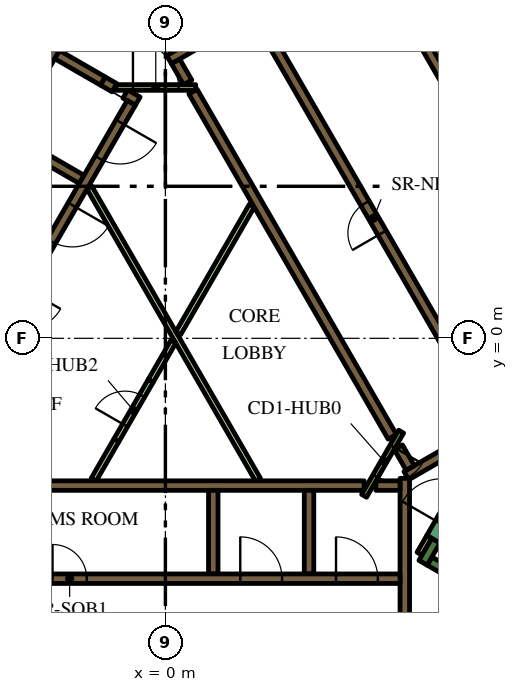
"""IFC4 building model, lengths in metres.
Left out: names, types, materials, properties, quantities, classifications, styles, units other than length and angle.
Written with IfcOpenShell. Run it as: python <this file> out.ifc"""

import sys

from ifc_helpers import new_model, si_unit, direction, frame, frame_2d, origin, place, context, subcontext, project, spatial, polyline, rectangle, outline, extrude, element, fill, save


model = new_model("IFC4")
c1 = context("Model", 3, precision=1e-05, world=origin(), true_north=direction((0.0, 1.0)))
c2 = subcontext(c1, "Body", "Model", "MODEL_VIEW")
j1 = project(units=[si_unit("LENGTHUNIT", "METRE"), si_unit("PLANEANGLEUNIT", "RADIAN")], contexts=[c1])
p1 = place(None, origin())
s1 = spatial("IfcSite", under=j1, at=p1, CompositionType="ELEMENT")
p2 = place(p1, origin())
s2 = spatial("IfcBuilding", under=s1, at=p2, CompositionType="ELEMENT")
p3 = place(p2, frame((0.0, 0.0, 51.0)))
s3 = spatial("IfcBuildingStorey", under=s2, at=p3, CompositionType="ELEMENT", Elevation=51.0)
p4 = place(p3, frame((6.776, 13.364, 0.0), z_axis=(0.0, 0.0, 1.0), x_axis=(0.500004177138, -0.8660229921, 0.0)))
e1 = element("IfcWall", 1, at=p4, inside=s3, PredefinedType="SOLIDWALL", context=c2, shape_type="SweptSolid", body=[
    extrude(rectangle(XDim=20.204, YDim=0.9, at=frame_2d((10.102, 0.0))), origin(), (0.0, 0.0, 1.0), 3.9),
])
p5 = place(p3, frame((12.84, -9.261, 0.0), z_axis=(0.0, 0.0, 1.0), x_axis=(-0.866013990052, 0.500019768644, 0.0)))
e2 = element("IfcWall", 2, at=p5, inside=s3, PredefinedType="SOLIDWALL", context=c2, shape_type="SweptSolid", body=[
    extrude(rectangle(XDim=6.8, YDim=0.25, at=frame_2d((3.4, 0.0))), origin(), (0.0, 0.0, 1.0), 3.9),
])
p6 = place(p3, frame((6.78, -5.906, 0.0), z_axis=(0.0, 0.0, 1.0), x_axis=(0.500223362819, 0.865896406789, 0.0)))
e3 = element("IfcWall", 3, at=p6, inside=s3, PredefinedType="SOLIDWALL", context=c2, shape_type="SweptSolid", body=[
    extrude(rectangle(XDim=0.675, YDim=0.25, at=frame_2d((0.337, 0.0))), origin(), (0.0, 0.0, 1.0), 3.9),
])
p7 = place(p3, frame((-5.259, -3.875, 0.0), z_axis=(0.0, 0.0, 1.0), x_axis=(1.0, 0.0, 0.0)))
e4 = element("IfcWall", 4, at=p7, inside=s3, PredefinedType="SOLIDWALL", context=c2, shape_type="SweptSolid", body=[
    extrude(rectangle(XDim=10.489, YDim=0.25, at=frame_2d((5.244, 0.0))), origin(), (0.0, 0.0, 1.0), 3.9),
])
for number, where, z_axis, x_axis in (
    (5, (3.78, -4.0, 0.0), (0.0, 0.0, 1.0), (0.0, -1.0, 0.0)),
    (6, (1.26, -4.0, 0.0), (0.0, 0.0, 1.0), (0.0, -1.0, 0.0)),
):
    element("IfcWall", number, at=place(p3, frame(where, z_axis=z_axis, x_axis=x_axis)), inside=s3, PredefinedType="SOLIDWALL", context=c2, shape_type="SweptSolid", body=[
        extrude(rectangle(XDim=2.2, YDim=0.25, at=frame_2d((1.1, 0.0))), origin(), (0.0, 0.0, 1.0), 3.9),
    ])
p8 = place(p3, frame((6.3, -7.27, 0.0), z_axis=(0.0, 0.0, 1.0), x_axis=(0.0, 1.0, 0.0)))
e7 = element("IfcWall", 7, at=p8, inside=s3, PredefinedType="SOLIDWALL", context=c2, shape_type="SweptSolid", body=[
    extrude(rectangle(XDim=3.586, YDim=0.25, at=frame_2d((1.793, 0.0))), origin(), (0.0, 0.0, 1.0), 3.9),
])
p9 = place(p3, frame((5.538, -3.875, 0.0), z_axis=(0.0, 0.0, 1.0), x_axis=(1.0, 0.0, 0.0)))
e8 = element("IfcWall", 8, at=p9, inside=s3, PredefinedType="SOLIDWALL", context=c2, shape_type="SweptSolid", body=[
    extrude(rectangle(XDim=0.637, YDim=0.25, at=frame_2d((0.318, 0.0))), origin(), (0.0, 0.0, 1.0), 3.9),
])
p10 = place(p3, frame((9.346, -1.879, 0.0), z_axis=(0.0, 0.0, 1.0), x_axis=(-0.866048528039, -0.499959945477, 0.0)))
e9 = element("IfcWall", 9, at=p10, inside=s3, PredefinedType="SOLIDWALL", context=c2, shape_type="SweptSolid", body=[
    extrude(rectangle(XDim=3.47, YDim=0.25, at=frame_2d((1.735, 0.0))), origin(), (0.0, 0.0, 1.0), 3.9),
])
p11 = place(p3, frame((6.13, -2.867, 0.0), z_axis=(0.0, 0.0, 1.0), x_axis=(0.500160776593, -0.865932559475, 0.0)))
e10 = element("IfcWall", 10, at=p11, inside=s3, PredefinedType="SOLIDWALL", context=c2, shape_type="SweptSolid", body=[
    extrude(rectangle(XDim=0.627, YDim=0.25, at=frame_2d((0.313, 0.0))), origin(), (0.0, 0.0, 1.0), 3.9),
])
p12 = place(p3, origin())
e11 = element("IfcWall", 11, at=p12, inside=s3, PredefinedType="SOLIDWALL", context=c2, shape_type="SweptSolid", body=[
    extrude(outline(polyline([(2.776, 8.733), (2.499, 8.573), (2.498, 8.573), (2.498, 8.573), (2.282, 8.448), (2.282, 8.448), (0.377, 7.348), (0.16, 7.223), (0.035, 7.439), (3.032, 9.169), (3.03, 9.152), (3.03, 9.133), (3.031, 9.113), (3.035, 9.094), (3.04, 9.075), (3.047, 9.057), (3.056, 9.039), (3.119, 8.931), (2.776, 8.733)])), origin(), (0.0, 0.0, 1.0), 3.9),
])
p13 = place(p3, frame((0.268, 7.285, 0.0), z_axis=(0.0, 0.0, 1.0), x_axis=(0.500098681536, -0.865968422476, 0.0)))
e12 = element("IfcWall", 12, at=p13, inside=s3, PredefinedType="SOLIDWALL", context=c2, shape_type="SweptSolid", body=[
    extrude(rectangle(XDim=0.636, YDim=0.25, at=frame_2d((0.318, 0.0))), origin(), (0.0, 0.0, 1.0), 3.9),
])
p14 = place(p3, frame((5.97, -2.591, 0.0), z_axis=(0.0, 0.0, 1.0), x_axis=(-0.499994469932, 0.866028596547, 0.0)))
e13 = element("IfcWall", 13, at=p14, inside=s3, PredefinedType="SOLIDWALL", context=c2, shape_type="SweptSolid", body=[
    extrude(rectangle(XDim=10.488, YDim=0.25, at=frame_2d((5.244, 0.0))), origin(), (0.0, 0.0, 1.0), 3.9),
])
p15 = place(p3, frame((-8.06, -1.311, 0.0), z_axis=(0.0, 0.0, 1.0), x_axis=(0.50000273126, 0.866023826885, 0.0)))
e14 = element("IfcWall", 14, at=p15, inside=s3, PredefinedType="SOLIDWALL", context=c2, shape_type="SweptSolid", body=[
    extrude(rectangle(XDim=10.33, YDim=0.25, at=frame_2d((5.165, 0.0))), origin(), (0.0, 0.0, 1.0), 3.9),
])
p16 = place(p3, frame((-1.342, 6.595, 0.0), z_axis=(0.0, 0.0, 1.0), x_axis=(-0.866046247233, 0.49996389635, 0.0)))
e15 = element("IfcWall", 15, at=p16, inside=s3, PredefinedType="SOLIDWALL", context=c2, shape_type="SweptSolid", body=[
    extrude(rectangle(XDim=0.35, YDim=0.25, at=frame_2d((0.175, 0.0))), origin(), (0.0, 0.0, 1.0), 3.9),
])
p17 = place(p3, frame((-1.647, 6.771, 0.0), z_axis=(0.0, 0.0, 1.0), x_axis=(-0.865971728693, 0.500092956464, 0.0)))
e16 = element("IfcWall", 16, at=p17, inside=s3, PredefinedType="SOLIDWALL", context=c2, shape_type="SweptSolid", body=[
    extrude(rectangle(XDim=1.388, YDim=0.25, at=frame_2d((0.694, 0.0))), origin(), (0.0, 0.0, 1.0), 3.9),
])
p18 = place(p3, frame((-0.728, 6.24, 0.0), z_axis=(0.0, 0.0, 1.0), x_axis=(-0.866088799389, 0.499890179513, 0.0)))
e17 = element("IfcWall", 17, at=p18, inside=s3, PredefinedType="SOLIDWALL", context=c2, shape_type="SweptSolid", body=[
    extrude(rectangle(XDim=0.378, YDim=0.25, at=frame_2d((0.189, 0.0))), origin(), (0.0, 0.0, 1.0), 3.9),
])
p19 = place(p3, frame((-2.204, 4.182, 0.0), z_axis=(0.0, 0.0, 1.0), x_axis=(-0.866008176907, 0.50002983664, 0.0)))
e18 = element("IfcWall", 18, at=p19, inside=s3, PredefinedType="SOLIDWALL", context=c2, shape_type="SweptSolid", body=[
    extrude(rectangle(XDim=2.2, YDim=0.25, at=frame_2d((1.1, 0.0))), origin(), (0.0, 0.0, 1.0), 3.9),
])
p20 = place(p3, frame((-1.887, -3.718, 0.0), z_axis=(0.0, 0.0, 1.0), x_axis=(0.500057179532, 0.865992388649, 0.0)))
e19 = element("IfcWall", 19, at=p20, inside=s3, PredefinedType="PARTITIONING", context=c2, shape_type="SweptSolid", body=[
    extrude(rectangle(XDim=1.199, YDim=0.15, at=frame_2d((0.6, 0.0))), origin(), (0.0, 0.0, 1.0), 2.75),
])
p21 = place(p3, frame((6.945, -5.222, 0.0), z_axis=(0.0, 0.0, 1.0), x_axis=(-0.499818422106, -0.866130212453, 0.0)))
e20 = element("IfcWall", 20, at=p21, inside=s3, PredefinedType="PARTITIONING", context=c2, shape_type="SweptSolid", body=[
    extrude(rectangle(XDim=0.514, YDim=0.15, at=frame_2d((0.257, 0.0))), origin(), (0.0, 0.0, 1.0), 2.75),
])
p22 = place(p3, frame((2.435, -3.718, 0.0), z_axis=(0.0, 0.0, 1.0), x_axis=(-0.499985176046, 0.866033962229, 0.0)))
e21 = element("IfcWall", 21, at=p22, inside=s3, PredefinedType="PARTITIONING", context=c2, shape_type="SweptSolid", body=[
    extrude(rectangle(XDim=8.875, YDim=0.15, at=frame_2d((4.438, 0.0))), origin(), (0.0, 0.0, 1.0), 2.75),
])
p23 = place(p3, frame((0.336, 0.132, 0.0), z_axis=(0.0, 0.0, 1.0), x_axis=(0.500001957507, 0.866024273614, 0.0)))
e22 = element("IfcWall", 22, at=p23, inside=s3, PredefinedType="PARTITIONING", context=c2, shape_type="SweptSolid", body=[
    extrude(rectangle(XDim=3.881, YDim=0.15, at=frame_2d((1.941, 0.0))), origin(), (0.0, 0.0, 1.0), 2.75),
])
p24 = place(p3, frame((-0.387, -1.121, 0.0), z_axis=(0.0, 0.0, 1.0), x_axis=(0.500057179532, 0.865992388649, 0.0)))
e23 = element("IfcWall", 23, at=p24, inside=s3, PredefinedType="PARTITIONING", context=c2, shape_type="SweptSolid", body=[
    extrude(rectangle(XDim=1.199, YDim=0.15, at=frame_2d((0.6, 0.0))), origin(), (0.0, 0.0, 1.0), 2.75),
])
p25 = place(p3, frame((-6.175, -6.325, 0.0), z_axis=(0.0, 0.0, 1.0), x_axis=(1.0, 0.0, 0.0)))
e24 = element("IfcWall", 24, at=p25, inside=s3, PredefinedType="SOLIDWALL", context=c2, shape_type="SweptSolid", body=[
    extrude(rectangle(XDim=12.35, YDim=0.25, at=frame_2d((6.175, 0.0))), origin(), (0.0, 0.0, 1.0), 3.9),
])
p26 = place(p25, frame((3.205, 0.0, 0.0)))
e25 = element("IfcOpeningElement", 25, at=p26, cuts=e24, PredefinedType="OPENING", context=c2, shape_type="SweptSolid", body=[
    extrude(rectangle(XDim=0.9, YDim=2.1, at=frame_2d((0.45, 1.05))), frame((0.0, 0.135, 0.0), z_axis=(0.0, -1.0, 0.0), x_axis=(1.0, 0.0, 0.0)), (0.0, 0.0, 1.0), 0.27),
])
p27 = place(p25, frame((8.145, 0.0, 0.0)))
e26 = element("IfcOpeningElement", 26, at=p27, cuts=e24, PredefinedType="OPENING", context=c2, shape_type="SweptSolid", body=[
    extrude(rectangle(XDim=1.1, YDim=2.1, at=frame_2d((0.55, 1.05))), frame((0.0, 0.135, 0.0), z_axis=(0.0, -1.0, 0.0), x_axis=(1.0, 0.0, 0.0)), (0.0, 0.0, 1.0), 0.27),
])
p28 = place(p25, frame((10.665, 0.0, 0.0)))
e27 = element("IfcOpeningElement", 27, at=p28, cuts=e24, PredefinedType="OPENING", context=c2, shape_type="SweptSolid", body=[
    extrude(rectangle(XDim=1.1, YDim=2.1, at=frame_2d((0.55, 1.05))), frame((0.0, 0.135, 0.0), z_axis=(0.0, -1.0, 0.0), x_axis=(1.0, 0.0, 0.0)), (0.0, 0.0, 1.0), 0.27),
])
p29 = place(p3, frame((11.553, -0.46, 0.0), z_axis=(0.0, 0.0, 1.0), x_axis=(-0.500006514828, 0.866021642414, 0.0)))
e28 = element("IfcWall", 28, at=p29, inside=s3, PredefinedType="SOLIDWALL", context=c2, shape_type="SweptSolid", body=[
    extrude(rectangle(XDim=12.35, YDim=0.25, at=frame_2d((6.175, 0.0))), origin(), (0.0, 0.0, 1.0), 3.9),
])
p30 = place(p29, frame((0.585, 0.0, 0.0)))
e29 = element("IfcOpeningElement", 29, at=p30, cuts=e28, PredefinedType="OPENING", context=c2, shape_type="SweptSolid", body=[
    extrude(rectangle(XDim=1.1, YDim=2.1, at=frame_2d((0.55, 1.05))), frame((0.0, 0.135, 0.0), z_axis=(0.0, -1.0, 0.0), x_axis=(1.0, 0.0, 0.0)), (0.0, 0.0, 1.0), 0.27),
])
p31 = place(p29, frame((3.105, 0.0, 0.0)))
e30 = element("IfcOpeningElement", 30, at=p31, cuts=e28, PredefinedType="OPENING", context=c2, shape_type="SweptSolid", body=[
    extrude(rectangle(XDim=1.1, YDim=2.1, at=frame_2d((0.55, 1.05))), frame((0.0, 0.135, 0.0), z_axis=(0.0, -1.0, 0.0), x_axis=(1.0, 0.0, 0.0)), (0.0, 0.0, 1.0), 0.27),
])
p32 = place(p29, frame((5.625, 0.0, 0.0)))
e31 = element("IfcOpeningElement", 31, at=p32, cuts=e28, PredefinedType="OPENING", context=c2, shape_type="SweptSolid", body=[
    extrude(rectangle(XDim=1.1, YDim=2.1, at=frame_2d((0.55, 1.05))), frame((0.0, 0.135, 0.0), z_axis=(0.0, -1.0, 0.0), x_axis=(1.0, 0.0, 0.0)), (0.0, 0.0, 1.0), 0.27),
])
p33 = place(p3, frame((8.565, -2.185, 0.0), z_axis=(0.0, 0.0, 1.0), x_axis=(-0.499997954832, 0.866026584559, 0.0)))
e32 = element("IfcWall", 32, at=p33, inside=s3, PredefinedType="SOLIDWALL", context=c2, shape_type="SweptSolid", body=[
    extrude(rectangle(XDim=12.35, YDim=0.25, at=frame_2d((6.175, 0.0))), origin(), (0.0, 0.0, 1.0), 3.9),
])
p34 = place(p33, frame((5.725, 0.0, 0.0)))
e33 = element("IfcOpeningElement", 33, at=p34, cuts=e32, PredefinedType="OPENING", context=c2, shape_type="SweptSolid", body=[
    extrude(rectangle(XDim=0.9, YDim=2.1, at=frame_2d((0.45, 1.05))), frame((0.0, 0.135, 0.0), z_axis=(0.0, -1.0, 0.0), x_axis=(1.0, 0.0, 0.0)), (0.0, 0.0, 1.0), 0.27),
])
p35 = place(p3, frame((-0.898, 6.194, 0.0), z_axis=(0.0, 0.0, 1.0), x_axis=(-0.499996202215, -0.866027596426, 0.0)))
e34 = element("IfcWall", 34, at=p35, inside=s3, PredefinedType="SOLIDWALL", context=c2, shape_type="SweptSolid", body=[
    extrude(rectangle(XDim=9.83, YDim=0.25, at=frame_2d((4.915, 0.0))), origin(), (0.0, 0.0, 1.0), 3.9),
])
p36 = place(p35, frame((0.585, 0.0, 0.0)))
e35 = element("IfcOpeningElement", 35, at=p36, cuts=e34, PredefinedType="OPENING", context=c2, shape_type="SweptSolid", body=[
    extrude(rectangle(XDim=1.1, YDim=2.1, at=frame_2d((0.55, 1.05))), frame((0.0, 0.135, 0.0), z_axis=(0.0, -1.0, 0.0), x_axis=(1.0, 0.0, 0.0)), (0.0, 0.0, 1.0), 0.27),
])
p37 = place(p35, frame((3.105, 0.0, 0.0)))
e36 = element("IfcOpeningElement", 36, at=p37, cuts=e34, PredefinedType="OPENING", context=c2, shape_type="SweptSolid", body=[
    extrude(rectangle(XDim=1.1, YDim=2.1, at=frame_2d((0.55, 1.05))), frame((0.0, 0.135, 0.0), z_axis=(0.0, -1.0, 0.0), x_axis=(1.0, 0.0, 0.0)), (0.0, 0.0, 1.0), 0.27),
])
p38 = place(p35, frame((5.625, 0.0, 0.0)))
e37 = element("IfcOpeningElement", 37, at=p38, cuts=e34, PredefinedType="OPENING", context=c2, shape_type="SweptSolid", body=[
    extrude(rectangle(XDim=1.1, YDim=2.1, at=frame_2d((0.55, 1.05))), frame((0.0, 0.135, 0.0), z_axis=(0.0, -1.0, 0.0), x_axis=(1.0, 0.0, 0.0)), (0.0, 0.0, 1.0), 0.27),
])
p39 = place(p35, frame((8.145, 0.0, 0.0)))
e38 = element("IfcOpeningElement", 38, at=p39, cuts=e34, PredefinedType="OPENING", context=c2, shape_type="SweptSolid", body=[
    extrude(rectangle(XDim=1.1, YDim=2.1, at=frame_2d((0.55, 1.05))), frame((0.0, 0.135, 0.0), z_axis=(0.0, -1.0, 0.0), x_axis=(1.0, 0.0, 0.0)), (0.0, 0.0, 1.0), 0.27),
])
p40 = place(p3, frame((7.053, -5.284, 0.0), z_axis=(0.0, 0.0, 1.0), x_axis=(0.500078061341, 0.865980330357, 0.0)))
e39 = element("IfcWall", 39, at=p40, inside=s3, PredefinedType="SOLIDWALL", context=c2, shape_type="SweptSolid", body=[
    extrude(rectangle(XDim=2.1, YDim=0.4, at=frame_2d((1.05, 0.0))), origin(), (0.0, 0.0, 1.0), 3.9),
])
p41 = place(p40, frame((0.45, 0.0, 0.0)))
e40 = element("IfcOpeningElement", 40, at=p41, cuts=e39, PredefinedType="OPENING", context=c2, shape_type="SweptSolid", body=[
    extrude(rectangle(XDim=1.2, YDim=2.1, at=frame_2d((0.6, 1.05))), frame((0.0, 0.21, 0.0), z_axis=(0.0, -1.0, 0.0), x_axis=(1.0, 0.0, 0.0)), (0.0, 0.0, 1.0), 0.42),
])
p42 = place(p3, frame((6.203, -2.456, 0.0), z_axis=(0.0, 0.0, 1.0), x_axis=(-0.500043961785, -0.866000020948, 0.0)))
e41 = element("IfcWall", 41, at=p42, inside=s3, PredefinedType="PARTITIONING", context=c2, shape_type="SweptSolid", body=[
    extrude(rectangle(XDim=1.95, YDim=0.15, at=frame_2d((0.975, 0.0))), origin(), (0.0, 0.0, 1.0), 3.9),
])
p43 = place(p42, frame((0.45, 0.0, 0.0)))
e42 = element("IfcOpeningElement", 42, at=p43, cuts=e41, PredefinedType="OPENING", context=c2, shape_type="SweptSolid", body=[
    extrude(rectangle(XDim=0.9, YDim=2.1, at=frame_2d((0.45, 1.05))), frame((0.0, 0.085, 0.0), z_axis=(0.0, -1.0, 0.0), x_axis=(1.0, 0.0, 0.0)), (0.0, 0.0, 1.0), 0.17),
])
p44 = place(p3, frame((-1.303, 6.6, 0.0), z_axis=(0.0, 0.0, 1.0), x_axis=(1.0, 0.0, 0.0)))
e43 = element("IfcWall", 43, at=p44, inside=s3, PredefinedType="PARTITIONING", context=c2, shape_type="SweptSolid", body=[
    extrude(rectangle(XDim=2.1, YDim=0.15, at=frame_2d((1.05, 0.0))), origin(), (0.0, 0.0, 1.0), 3.9),
])
p45 = place(p44, frame((0.45, 0.0, 0.0)))
e44 = element("IfcOpeningElement", 44, at=p45, cuts=e43, PredefinedType="OPENING", context=c2, shape_type="SweptSolid", body=[
    extrude(rectangle(XDim=1.2, YDim=2.1, at=frame_2d((0.6, 1.05))), frame((0.0, 0.085, 0.0), z_axis=(0.0, -1.0, 0.0), x_axis=(1.0, 0.0, 0.0)), (0.0, 0.0, 1.0), 0.17),
])
p46 = place(p3, frame((-1.287, -2.679, 0.0), z_axis=(0.0, 0.0, 1.0), x_axis=(0.499961193289, 0.866047807691, 0.0)))
e45 = element("IfcWall", 45, at=p46, inside=s3, PredefinedType="PARTITIONING", context=c2, shape_type="SweptSolid", body=[
    extrude(rectangle(XDim=1.8, YDim=0.15, at=frame_2d((0.9, 0.0))), origin(), (0.0, 0.0, 1.0), 2.75),
])
p47 = place(p46, frame((0.45, 0.0, 0.0)))
e46 = element("IfcOpeningElement", 46, at=p47, cuts=e45, PredefinedType="OPENING", context=c2, shape_type="SweptSolid", body=[
    extrude(rectangle(XDim=0.9, YDim=2.1, at=frame_2d((0.45, 1.05))), frame((0.0, 0.085, 0.0), z_axis=(0.0, -1.0, 0.0), x_axis=(1.0, 0.0, 0.0)), (0.0, 0.0, 1.0), 0.17),
])
p48 = place(p3, frame((6.163, 18.475, 0.0), z_axis=(0.0, 0.0, 1.0), x_axis=(0.500001317485, -0.866024643133, 0.0)))
e47 = element("IfcWall", 47, at=p48, inside=s3, PredefinedType="PARTITIONING", context=c2, shape_type="SweptSolid", body=[
    extrude(rectangle(XDim=25.767, YDim=0.15, at=frame_2d((12.883, 0.0))), origin(), (0.0, 0.0, 1.0), 2.75),
])
p49 = place(p48, frame((24.586, 0.0, 0.0)))
e48 = element("IfcOpeningElement", 48, at=p49, cuts=e47, PredefinedType="OPENING", context=c2, shape_type="SweptSolid", body=[
    extrude(rectangle(XDim=1.0, YDim=2.1, at=frame_2d((0.5, 1.05))), frame((0.0, 0.085, 0.0), z_axis=(0.0, -1.0, 0.0), x_axis=(1.0, 0.0, 0.0)), (0.0, 0.0, 1.0), 0.17),
])
p50 = place(p48, frame((13.144, 0.0, 0.0)))
e49 = element("IfcOpeningElement", 49, at=p50, cuts=e47, PredefinedType="OPENING", context=c2, shape_type="SweptSolid", body=[
    extrude(rectangle(XDim=1.0, YDim=2.1, at=frame_2d((0.5, 1.05))), frame((0.0, 0.085, 0.0), z_axis=(0.0, -1.0, 0.0), x_axis=(1.0, 0.0, 0.0)), (0.0, 0.0, 1.0), 0.17),
])
p51 = place(p48, frame((11.692, 0.0, 0.0)))
e50 = element("IfcOpeningElement", 50, at=p51, cuts=e47, PredefinedType="OPENING", context=c2, shape_type="SweptSolid", body=[
    extrude(rectangle(XDim=1.0, YDim=2.1, at=frame_2d((0.5, 1.05))), frame((0.0, 0.085, 0.0), z_axis=(0.0, -1.0, 0.0), x_axis=(1.0, 0.0, 0.0)), (0.0, 0.0, 1.0), 0.17),
])
p52 = place(p48, frame((0.572, 0.0, 0.0)))
e51 = element("IfcOpeningElement", 51, at=p52, cuts=e47, PredefinedType="OPENING", context=c2, shape_type="SweptSolid", body=[
    extrude(rectangle(XDim=1.0, YDim=2.1, at=frame_2d((0.5, 1.05))), frame((0.0, 0.085, 0.0), z_axis=(0.0, -1.0, 0.0), x_axis=(1.0, 0.0, 0.0)), (0.0, 0.0, 1.0), 0.17),
])
p53 = place(p26, origin())
e52 = element("IfcDoor", 52, at=p53, inside=s3, OperationType="SINGLE_SWING_LEFT", PredefinedType="DOOR", context=c2, shape_type="SweptSolid", body=[
    extrude(rectangle(XDim=0.9, YDim=2.1, at=frame_2d((0.45, 1.05))), frame((0.0, 0.025, 0.0), z_axis=(0.0, -1.0, 0.0), x_axis=(1.0, 0.0, 0.0)), (0.0, 0.0, 1.0), 0.05),
])
fill(e25, e52)
p54 = place(p27, origin())
e53 = element("IfcDoor", 53, at=p54, inside=s3, OperationType="DOUBLE_DOOR_SLIDING", PredefinedType="DOOR", context=c2, shape_type="SweptSolid", body=[
    extrude(rectangle(XDim=1.1, YDim=2.1, at=frame_2d((0.55, 1.05))), frame((0.0, 0.025, 0.0), z_axis=(0.0, -1.0, 0.0), x_axis=(1.0, 0.0, 0.0)), (0.0, 0.0, 1.0), 0.05),
])
fill(e26, e53)
p55 = place(p28, origin())
e54 = element("IfcDoor", 54, at=p55, inside=s3, OperationType="DOUBLE_DOOR_SLIDING", PredefinedType="DOOR", context=c2, shape_type="SweptSolid", body=[
    extrude(rectangle(XDim=1.1, YDim=2.1, at=frame_2d((0.55, 1.05))), frame((0.0, 0.025, 0.0), z_axis=(0.0, -1.0, 0.0), x_axis=(1.0, 0.0, 0.0)), (0.0, 0.0, 1.0), 0.05),
])
fill(e27, e54)
p56 = place(p34, origin())
e55 = element("IfcDoor", 55, at=p56, inside=s3, OperationType="SINGLE_SWING_LEFT", PredefinedType="DOOR", context=c2, shape_type="SweptSolid", body=[
    extrude(rectangle(XDim=0.9, YDim=2.1, at=frame_2d((0.45, 1.05))), frame((0.0, 0.025, 0.0), z_axis=(0.0, -1.0, 0.0), x_axis=(1.0, 0.0, 0.0)), (0.0, 0.0, 1.0), 0.05),
])
fill(e33, e55)
p57 = place(p36, origin())
e56 = element("IfcDoor", 56, at=p57, inside=s3, OperationType="DOUBLE_DOOR_SLIDING", PredefinedType="DOOR", context=c2, shape_type="SweptSolid", body=[
    extrude(rectangle(XDim=1.1, YDim=2.1, at=frame_2d((0.55, 1.05))), frame((0.0, 0.025, 0.0), z_axis=(0.0, -1.0, 0.0), x_axis=(1.0, 0.0, 0.0)), (0.0, 0.0, 1.0), 0.05),
])
fill(e35, e56)
p58 = place(p37, origin())
e57 = element("IfcDoor", 57, at=p58, inside=s3, OperationType="DOUBLE_DOOR_SLIDING", PredefinedType="DOOR", context=c2, shape_type="SweptSolid", body=[
    extrude(rectangle(XDim=1.1, YDim=2.1, at=frame_2d((0.55, 1.05))), frame((0.0, 0.025, 0.0), z_axis=(0.0, -1.0, 0.0), x_axis=(1.0, 0.0, 0.0)), (0.0, 0.0, 1.0), 0.05),
])
fill(e36, e57)
p59 = place(p43, origin())
e58 = element("IfcDoor", 58, at=p59, inside=s3, OperationType="SINGLE_SWING_LEFT", PredefinedType="DOOR", context=c2, shape_type="SweptSolid", body=[
    extrude(rectangle(XDim=0.9, YDim=2.1, at=frame_2d((0.45, 1.05))), frame((0.0, 0.025, 0.0), z_axis=(0.0, -1.0, 0.0), x_axis=(1.0, 0.0, 0.0)), (0.0, 0.0, 1.0), 0.05),
])
fill(e42, e58)
p60 = place(p45, origin())
e59 = element("IfcDoor", 59, at=p60, inside=s3, OperationType="SINGLE_SWING_LEFT", PredefinedType="DOOR", context=c2, shape_type="SweptSolid", body=[
    extrude(rectangle(XDim=1.2, YDim=2.1, at=frame_2d((0.6, 1.05))), frame((0.0, 0.025, 0.0), z_axis=(0.0, -1.0, 0.0), x_axis=(1.0, 0.0, 0.0)), (0.0, 0.0, 1.0), 0.05),
])
fill(e44, e59)
p61 = place(p47, origin())
e60 = element("IfcDoor", 60, at=p61, inside=s3, OperationType="SINGLE_SWING_LEFT", PredefinedType="DOOR", context=c2, shape_type="SweptSolid", body=[
    extrude(rectangle(XDim=0.9, YDim=2.1, at=frame_2d((0.45, 1.05))), frame((0.0, 0.025, 0.0), z_axis=(0.0, -1.0, 0.0), x_axis=(1.0, 0.0, 0.0)), (0.0, 0.0, 1.0), 0.05),
])
fill(e46, e60)
save(model, sys.argv[1])
